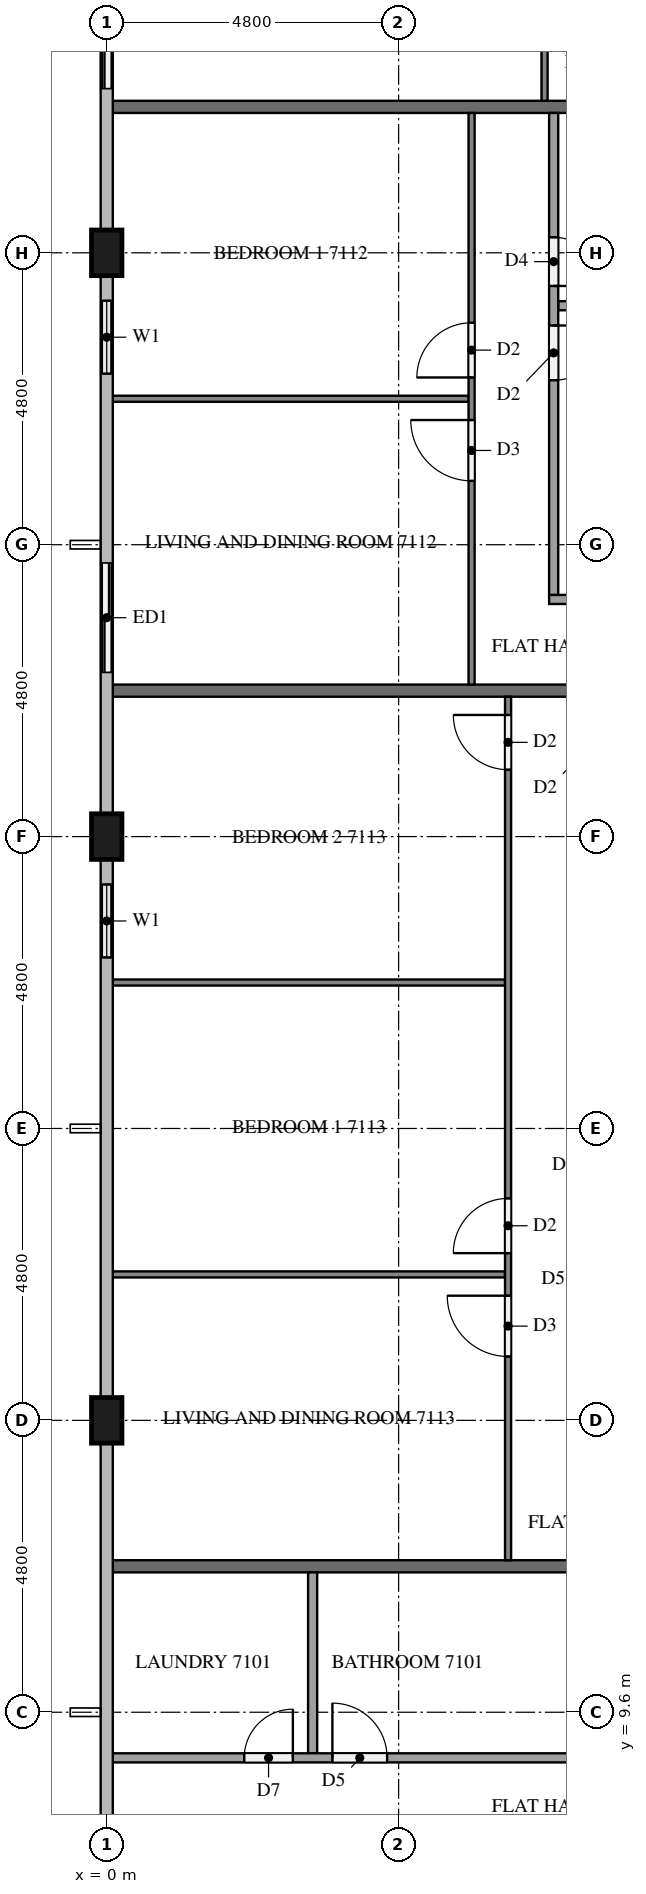
"""IFC4 building model, lengths in metres.
Left out: names, types, materials, properties, quantities, classifications, styles, units other than length and angle.
Written with IfcOpenShell. Run it as: python <this file> out.ifc"""

import sys

from ifc_helpers import new_model, si_unit, direction, frame, frame_2d, origin, origin_2d, place, context, subcontext, project, spatial, rectangle, extrude, element, fill, save


model = new_model("IFC4")
c1 = context("Model", 3, precision=1e-05, world=origin(), true_north=direction((0.0, 1.0)))
c2 = subcontext(c1, "Body", "Model", "MODEL_VIEW")
j1 = project(units=[si_unit("LENGTHUNIT", "METRE"), si_unit("PLANEANGLEUNIT", "RADIAN")], contexts=[c1])
p1 = place(None, origin())
s1 = spatial("IfcSite", under=j1, at=p1, CompositionType="ELEMENT")
p2 = place(p1, origin())
s2 = spatial("IfcBuilding", under=s1, at=p2, CompositionType="ELEMENT")
p3 = place(p2, frame((0.0, 0.0, 272.1)))
s3 = spatial("IfcBuildingStorey", under=s2, at=p3, CompositionType="ELEMENT", Elevation=272.1)
for number, where, z_axis, x_axis in (
    (1, (0.0, 33.6, 0.0), (0.0, 0.0, 1.0), (0.0, 1.0, 0.0)),
    (2, (0.0, 24.0, 0.0), (0.0, 0.0, 1.0), (0.0, 1.0, 0.0)),
    (3, (0.0, 14.4, 0.0), (0.0, 0.0, 1.0), (0.0, 1.0, 0.0)),
):
    element("IfcColumn", number, at=place(p3, frame(where, z_axis=z_axis, x_axis=x_axis)), inside=s3, PredefinedType="COLUMN", context=c2, shape_type="SweptSolid", body=[
        extrude(rectangle(XDim=0.75, YDim=0.5, at=origin_2d()), origin(), (0.0, 0.0, 1.0), 3.2),
    ])
p4 = place(p3, frame((0.0, 38.4, 0.0), z_axis=(0.0, 0.0, 1.0), x_axis=(0.0, -1.0, 0.0)))
e4 = element("IfcWall", 4, at=p4, inside=s3, PredefinedType="SOLIDWALL", context=c2, shape_type="SweptSolid", body=[
    extrude(rectangle(XDim=2.4, YDim=0.15, at=frame_2d((1.2, 0.0))), origin(), (0.0, 0.0, 1.0), 3.2),
])
p5 = place(p4, frame((0.3, 0.0, 0.0)))
e5 = element("IfcOpeningElement", 5, at=p5, cuts=e4, PredefinedType="OPENING", context=c2, shape_type="SweptSolid", body=[
    extrude(rectangle(XDim=1.8, YDim=2.4, at=frame_2d((0.9, 1.2))), frame((0.0, 0.085, 0.0), z_axis=(0.0, -1.0, 0.0), x_axis=(1.0, 0.0, 0.0)), (0.0, 0.0, 1.0), 0.17),
])
p6 = place(p3, frame((0.0, 33.225, 0.0), z_axis=(0.0, 0.0, 1.0), x_axis=(0.0, -1.0, 0.0)))
e6 = element("IfcWall", 6, at=p6, inside=s3, PredefinedType="SOLIDWALL", context=c2, shape_type="SweptSolid", body=[
    extrude(rectangle(XDim=2.025, YDim=0.15, at=frame_2d((1.013, 0.0))), origin(), (0.0, 0.0, 1.0), 3.2),
])
p7 = place(p6, frame((0.413, 0.0, 0.9)))
e7 = element("IfcOpeningElement", 7, at=p7, cuts=e6, PredefinedType="OPENING", context=c2, shape_type="SweptSolid", body=[
    extrude(rectangle(XDim=1.2, YDim=1.4, at=frame_2d((0.6, 0.7))), frame((0.0, 0.085, 0.0), z_axis=(0.0, -1.0, 0.0), x_axis=(1.0, 0.0, 0.0)), (0.0, 0.0, 1.0), 0.17),
])
p8 = place(p3, frame((0.0, 28.8, 0.0), z_axis=(0.0, 0.0, 1.0), x_axis=(0.0, -1.0, 0.0)))
e8 = element("IfcWall", 8, at=p8, inside=s3, PredefinedType="SOLIDWALL", context=c2, shape_type="SweptSolid", body=[
    extrude(rectangle(XDim=2.4, YDim=0.15, at=frame_2d((1.2, 0.0))), origin(), (0.0, 0.0, 1.0), 3.2),
])
p9 = place(p8, frame((0.3, 0.0, 0.0)))
e9 = element("IfcOpeningElement", 9, at=p9, cuts=e8, PredefinedType="OPENING", context=c2, shape_type="SweptSolid", body=[
    extrude(rectangle(XDim=1.8, YDim=2.4, at=frame_2d((0.9, 1.2))), frame((0.0, 0.085, 0.0), z_axis=(0.0, -1.0, 0.0), x_axis=(1.0, 0.0, 0.0)), (0.0, 0.0, 1.0), 0.17),
])
p10 = place(p3, frame((0.0, 23.625, 0.0), z_axis=(0.0, 0.0, 1.0), x_axis=(0.0, -1.0, 0.0)))
e10 = element("IfcWall", 10, at=p10, inside=s3, PredefinedType="SOLIDWALL", context=c2, shape_type="SweptSolid", body=[
    extrude(rectangle(XDim=2.025, YDim=0.15, at=frame_2d((1.012, 0.0))), origin(), (0.0, 0.0, 1.0), 3.2),
])
p11 = place(p10, frame((0.413, 0.0, 0.9)))
e11 = element("IfcOpeningElement", 11, at=p11, cuts=e10, PredefinedType="OPENING", context=c2, shape_type="SweptSolid", body=[
    extrude(rectangle(XDim=1.2, YDim=1.4, at=frame_2d((0.6, 0.7))), frame((0.0, 0.085, 0.0), z_axis=(0.0, -1.0, 0.0), x_axis=(1.0, 0.0, 0.0)), (0.0, 0.0, 1.0), 0.17),
])
for number, where, z_axis, x_axis in (
    (12, (0.1, 12.0, 0.0), (0.0, 0.0, 1.0), (1.0, 0.0, 0.0)),
    (13, (0.1, 36.0, 0.0), (0.0, 0.0, 1.0), (1.0, 0.0, 0.0)),
    (14, (0.1, 26.4, 0.0), (0.0, 0.0, 1.0), (1.0, 0.0, 0.0)),
):
    element("IfcWall", number, at=place(p3, frame(where, z_axis=z_axis, x_axis=x_axis)), inside=s3, PredefinedType="PARTITIONING", context=c2, shape_type="SweptSolid", body=[
        extrude(rectangle(XDim=11.8, YDim=0.2, at=frame_2d((5.9, 0.0))), origin(), (0.0, 0.0, 1.0), 3.2),
    ])
p12 = place(p3, frame((3.386, 11.9, 0.0), z_axis=(0.0, 0.0, 1.0), x_axis=(0.0, -1.0, 0.0)))
e15 = element("IfcWall", 15, at=p12, inside=s3, PredefinedType="PARTITIONING", context=c2, shape_type="SweptSolid", body=[
    extrude(rectangle(XDim=2.975, YDim=0.15, at=frame_2d((1.487, 0.0))), origin(), (0.0, 0.0, 1.0), 3.2),
])
p13 = place(p3, frame((0.1, 8.85, 0.0), z_axis=(0.0, 0.0, 1.0), x_axis=(1.0, 0.0, 0.0)))
e16 = element("IfcWall", 16, at=p13, inside=s3, PredefinedType="PARTITIONING", context=c2, shape_type="SweptSolid", body=[
    extrude(rectangle(XDim=17.525, YDim=0.15, at=frame_2d((8.762, 0.0))), origin(), (0.0, 0.0, 1.0), 3.2),
])
p14 = place(p13, frame((11.278, 0.0, 0.0)))
e17 = element("IfcOpeningElement", 17, at=p14, cuts=e16, PredefinedType="OPENING", context=c2, shape_type="SweptSolid", body=[
    extrude(rectangle(XDim=0.9, YDim=2.1, at=frame_2d((0.45, 1.05))), frame((0.0, 0.085, 0.0), z_axis=(0.0, -1.0, 0.0), x_axis=(1.0, 0.0, 0.0)), (0.0, 0.0, 1.0), 0.17),
])
p15 = place(p13, frame((9.828, 0.0, 0.0)))
e18 = element("IfcOpeningElement", 18, at=p15, cuts=e16, PredefinedType="OPENING", context=c2, shape_type="SweptSolid", body=[
    extrude(rectangle(XDim=0.8, YDim=2.1, at=frame_2d((0.4, 1.05))), frame((0.0, 0.085, 0.0), z_axis=(0.0, -1.0, 0.0), x_axis=(1.0, 0.0, 0.0)), (0.0, 0.0, 1.0), 0.17),
])
p16 = place(p13, frame((3.611, 0.0, 0.0)))
e19 = element("IfcOpeningElement", 19, at=p16, cuts=e16, PredefinedType="OPENING", context=c2, shape_type="SweptSolid", body=[
    extrude(rectangle(XDim=0.9, YDim=2.1, at=frame_2d((0.45, 1.05))), frame((0.0, 0.085, 0.0), z_axis=(0.0, -1.0, 0.0), x_axis=(1.0, 0.0, 0.0)), (0.0, 0.0, 1.0), 0.17),
])
p17 = place(p13, frame((2.161, 0.0, 0.0)))
e20 = element("IfcOpeningElement", 20, at=p17, cuts=e16, PredefinedType="OPENING", context=c2, shape_type="SweptSolid", body=[
    extrude(rectangle(XDim=0.8, YDim=2.1, at=frame_2d((0.4, 1.05))), frame((0.0, 0.085, 0.0), z_axis=(0.0, -1.0, 0.0), x_axis=(1.0, 0.0, 0.0)), (0.0, 0.0, 1.0), 0.17),
])
p18 = place(p3, frame((7.2, 36.1, 0.0), z_axis=(0.0, 0.0, 1.0), x_axis=(0.0, 1.0, 0.0)))
e21 = element("IfcWall", 21, at=p18, inside=s3, PredefinedType="PARTITIONING", context=c2, shape_type="SweptSolid", body=[
    extrude(rectangle(XDim=11.8, YDim=0.1, at=frame_2d((5.9, 0.0))), origin(), (0.0, 0.0, 1.0), 3.2),
])
p19 = place(p18, frame((5.75, 0.0, 0.0)))
e22 = element("IfcOpeningElement", 22, at=p19, cuts=e21, PredefinedType="OPENING", context=c2, shape_type="SweptSolid", body=[
    extrude(rectangle(XDim=1.0, YDim=2.1, at=frame_2d((0.5, 1.05))), frame((0.0, 0.06, 0.0), z_axis=(0.0, -1.0, 0.0), x_axis=(1.0, 0.0, 0.0)), (0.0, 0.0, 1.0), 0.12),
])
p20 = place(p18, frame((7.45, 0.0, 0.0)))
e23 = element("IfcOpeningElement", 23, at=p20, cuts=e21, PredefinedType="OPENING", context=c2, shape_type="SweptSolid", body=[
    extrude(rectangle(XDim=0.9, YDim=2.1, at=frame_2d((0.45, 1.05))), frame((0.0, 0.06, 0.0), z_axis=(0.0, -1.0, 0.0), x_axis=(1.0, 0.0, 0.0)), (0.0, 0.0, 1.0), 0.12),
])
p21 = place(p3, frame((5.95, 31.2, 0.0), z_axis=(0.0, 0.0, 1.0), x_axis=(-1.0, 0.0, 0.0)))
e24 = element("IfcWall", 24, at=p21, inside=s3, PredefinedType="PARTITIONING", context=c2, shape_type="SweptSolid", body=[
    extrude(rectangle(XDim=5.85, YDim=0.1, at=frame_2d((2.925, 0.0))), origin(), (0.0, 0.0, 1.0), 3.2),
])
p22 = place(p3, frame((6.0, 26.5, 0.0), z_axis=(0.0, 0.0, 1.0), x_axis=(0.0, 1.0, 0.0)))
e25 = element("IfcWall", 25, at=p22, inside=s3, PredefinedType="PARTITIONING", context=c2, shape_type="SweptSolid", body=[
    extrude(rectangle(XDim=9.4, YDim=0.1, at=frame_2d((4.7, 0.0))), origin(), (0.0, 0.0, 1.0), 3.2),
])
p23 = place(p22, frame((3.35, 0.0, 0.0)))
e26 = element("IfcOpeningElement", 26, at=p23, cuts=e25, PredefinedType="OPENING", context=c2, shape_type="SweptSolid", body=[
    extrude(rectangle(XDim=1.0, YDim=2.1, at=frame_2d((0.5, 1.05))), frame((0.0, 0.06, 0.0), z_axis=(0.0, -1.0, 0.0), x_axis=(1.0, 0.0, 0.0)), (0.0, 0.0, 1.0), 0.12),
])
p24 = place(p22, frame((5.05, 0.0, 0.0)))
e27 = element("IfcOpeningElement", 27, at=p24, cuts=e25, PredefinedType="OPENING", context=c2, shape_type="SweptSolid", body=[
    extrude(rectangle(XDim=0.9, YDim=2.1, at=frame_2d((0.45, 1.05))), frame((0.0, 0.06, 0.0), z_axis=(0.0, -1.0, 0.0), x_axis=(1.0, 0.0, 0.0)), (0.0, 0.0, 1.0), 0.12),
])
p25 = place(p3, frame((11.9, 32.73, 0.0), z_axis=(0.0, 0.0, 1.0), x_axis=(-1.0, 0.0, 0.0)))
e28 = element("IfcWall", 28, at=p25, inside=s3, PredefinedType="PARTITIONING", context=c2, shape_type="SweptSolid", body=[
    extrude(rectangle(XDim=4.475, YDim=0.15, at=frame_2d((2.237, 0.0))), origin(), (0.0, 0.0, 1.0), 3.2),
])
p26 = place(p3, frame((11.9, 27.9, 0.0), z_axis=(0.0, 0.0, 1.0), x_axis=(-1.0, 0.0, 0.0)))
e29 = element("IfcWall", 29, at=p26, inside=s3, PredefinedType="PARTITIONING", context=c2, shape_type="SweptSolid", body=[
    extrude(rectangle(XDim=4.625, YDim=0.15, at=frame_2d((2.312, 0.0))), origin(), (0.0, 0.0, 1.0), 3.2),
])
p27 = place(p3, frame((7.35, 35.9, 0.0), z_axis=(0.0, 0.0, 1.0), x_axis=(0.0, -1.0, 0.0)))
e30 = element("IfcWall", 30, at=p27, inside=s3, PredefinedType="PARTITIONING", context=c2, shape_type="SweptSolid", body=[
    extrude(rectangle(XDim=7.925, YDim=0.15, at=frame_2d((3.962, 0.0))), origin(), (0.0, 0.0, 1.0), 3.2),
])
p28 = place(p27, frame((3.495, 0.0, 0.0)))
e31 = element("IfcOpeningElement", 31, at=p28, cuts=e30, PredefinedType="OPENING", context=c2, shape_type="SweptSolid", body=[
    extrude(rectangle(XDim=0.9, YDim=2.1, at=frame_2d((0.45, 1.05))), frame((0.0, 0.085, 0.0), z_axis=(0.0, -1.0, 0.0), x_axis=(1.0, 0.0, 0.0)), (0.0, 0.0, 1.0), 0.17),
])
p29 = place(p27, frame((2.045, 0.0, 0.0)))
e32 = element("IfcOpeningElement", 32, at=p29, cuts=e30, PredefinedType="OPENING", context=c2, shape_type="SweptSolid", body=[
    extrude(rectangle(XDim=0.8, YDim=2.1, at=frame_2d((0.4, 1.05))), frame((0.0, 0.085, 0.0), z_axis=(0.0, -1.0, 0.0), x_axis=(1.0, 0.0, 0.0)), (0.0, 0.0, 1.0), 0.17),
])
for number, where, z_axis, x_axis in (
    (33, (6.55, 16.8, 0.0), (0.0, 0.0, 1.0), (-1.0, 0.0, 0.0)),
    (34, (6.55, 21.6, 0.0), (0.0, 0.0, 1.0), (-1.0, 0.0, 0.0)),
):
    element("IfcWall", number, at=place(p3, frame(where, z_axis=z_axis, x_axis=x_axis)), inside=s3, PredefinedType="PARTITIONING", context=c2, shape_type="SweptSolid", body=[
        extrude(rectangle(XDim=6.45, YDim=0.1, at=frame_2d((3.225, 0.0))), origin(), (0.0, 0.0, 1.0), 3.2),
    ])
p30 = place(p3, frame((6.6, 12.1, 0.0), z_axis=(0.0, 0.0, 1.0), x_axis=(0.0, 1.0, 0.0)))
e35 = element("IfcWall", 35, at=p30, inside=s3, PredefinedType="PARTITIONING", context=c2, shape_type="SweptSolid", body=[
    extrude(rectangle(XDim=14.2, YDim=0.1, at=frame_2d((7.1, 0.0))), origin(), (0.0, 0.0, 1.0), 3.2),
])
p31 = place(p30, frame((3.35, 0.0, 0.0)))
e36 = element("IfcOpeningElement", 36, at=p31, cuts=e35, PredefinedType="OPENING", context=c2, shape_type="SweptSolid", body=[
    extrude(rectangle(XDim=1.0, YDim=2.1, at=frame_2d((0.5, 1.05))), frame((0.0, 0.06, 0.0), z_axis=(0.0, -1.0, 0.0), x_axis=(1.0, 0.0, 0.0)), (0.0, 0.0, 1.0), 0.12),
])
p32 = place(p30, frame((5.05, 0.0, 0.0)))
e37 = element("IfcOpeningElement", 37, at=p32, cuts=e35, PredefinedType="OPENING", context=c2, shape_type="SweptSolid", body=[
    extrude(rectangle(XDim=0.9, YDim=2.1, at=frame_2d((0.45, 1.05))), frame((0.0, 0.06, 0.0), z_axis=(0.0, -1.0, 0.0), x_axis=(1.0, 0.0, 0.0)), (0.0, 0.0, 1.0), 0.12),
])
p33 = place(p30, frame((13.0, 0.0, 0.0)))
e38 = element("IfcOpeningElement", 38, at=p33, cuts=e35, PredefinedType="OPENING", context=c2, shape_type="SweptSolid", body=[
    extrude(rectangle(XDim=0.9, YDim=2.1, at=frame_2d((0.45, 1.05))), frame((0.0, 0.06, 0.0), z_axis=(0.0, -1.0, 0.0), x_axis=(1.0, 0.0, 0.0)), (0.0, 0.0, 1.0), 0.12),
])
p34 = place(p5, origin())
e39 = element("IfcDoor", 39, at=p34, inside=s3, OperationType="SLIDING_TO_LEFT", PredefinedType="DOOR", context=c2, shape_type="SweptSolid", body=[
    extrude(rectangle(XDim=1.8, YDim=2.4, at=frame_2d((0.9, 1.2))), frame((0.0, 0.025, 0.0), z_axis=(0.0, -1.0, 0.0), x_axis=(1.0, 0.0, 0.0)), (0.0, 0.0, 1.0), 0.05),
])
fill(e5, e39)
p35 = place(p7, origin())
e40 = element("IfcWindow", 40, at=p35, inside=s3, PartitioningType="SINGLE_PANEL", PredefinedType="WINDOW", context=c2, shape_type="SweptSolid", body=[
    extrude(rectangle(XDim=1.2, YDim=1.4, at=frame_2d((0.6, 0.7))), frame((0.0, 0.03, 0.0), z_axis=(0.0, -1.0, 0.0), x_axis=(1.0, 0.0, 0.0)), (0.0, 0.0, 1.0), 0.06),
])
fill(e7, e40)
p36 = place(p9, origin())
e41 = element("IfcDoor", 41, at=p36, inside=s3, OperationType="SLIDING_TO_RIGHT", PredefinedType="DOOR", context=c2, shape_type="SweptSolid", body=[
    extrude(rectangle(XDim=1.8, YDim=2.4, at=frame_2d((0.9, 1.2))), frame((0.0, 0.025, 0.0), z_axis=(0.0, -1.0, 0.0), x_axis=(1.0, 0.0, 0.0)), (0.0, 0.0, 1.0), 0.05),
])
fill(e9, e41)
p37 = place(p11, origin())
e42 = element("IfcWindow", 42, at=p37, inside=s3, PartitioningType="SINGLE_PANEL", PredefinedType="WINDOW", context=c2, shape_type="SweptSolid", body=[
    extrude(rectangle(XDim=1.2, YDim=1.4, at=frame_2d((0.6, 0.7))), frame((0.0, 0.03, 0.0), z_axis=(0.0, -1.0, 0.0), x_axis=(1.0, 0.0, 0.0)), (0.0, 0.0, 1.0), 0.06),
])
fill(e11, e42)
p38 = place(p16, origin())
e43 = element("IfcDoor", 43, at=p38, inside=s3, OperationType="SINGLE_SWING_LEFT", PredefinedType="DOOR", context=c2, shape_type="SweptSolid", body=[
    extrude(rectangle(XDim=0.9, YDim=2.1, at=frame_2d((0.45, 1.05))), frame((0.0, 0.025, 0.0), z_axis=(0.0, -1.0, 0.0), x_axis=(1.0, 0.0, 0.0)), (0.0, 0.0, 1.0), 0.05),
])
fill(e19, e43)
p39 = place(p17, origin())
e44 = element("IfcDoor", 44, at=p39, inside=s3, OperationType="SINGLE_SWING_RIGHT", PredefinedType="DOOR", context=c2, shape_type="SweptSolid", body=[
    extrude(rectangle(XDim=0.8, YDim=2.1, at=frame_2d((0.4, 1.05))), frame((0.0, 0.025, 0.0), z_axis=(0.0, -1.0, 0.0), x_axis=(1.0, 0.0, 0.0)), (0.0, 0.0, 1.0), 0.05),
])
fill(e20, e44)
p40 = place(p23, origin())
e45 = element("IfcDoor", 45, at=p40, inside=s3, OperationType="SINGLE_SWING_RIGHT", PredefinedType="DOOR", context=c2, shape_type="SweptSolid", body=[
    extrude(rectangle(XDim=1.0, YDim=2.1, at=frame_2d((0.5, 1.05))), frame((0.0, 0.025, 0.0), z_axis=(0.0, -1.0, 0.0), x_axis=(1.0, 0.0, 0.0)), (0.0, 0.0, 1.0), 0.05),
])
fill(e26, e45)
p41 = place(p24, origin())
e46 = element("IfcDoor", 46, at=p41, inside=s3, OperationType="SINGLE_SWING_LEFT", PredefinedType="DOOR", context=c2, shape_type="SweptSolid", body=[
    extrude(rectangle(XDim=0.9, YDim=2.1, at=frame_2d((0.45, 1.05))), frame((0.0, 0.025, 0.0), z_axis=(0.0, -1.0, 0.0), x_axis=(1.0, 0.0, 0.0)), (0.0, 0.0, 1.0), 0.05),
])
fill(e27, e46)
p42 = place(p28, origin())
e47 = element("IfcDoor", 47, at=p42, inside=s3, OperationType="SINGLE_SWING_LEFT", PredefinedType="DOOR", context=c2, shape_type="SweptSolid", body=[
    extrude(rectangle(XDim=0.9, YDim=2.1, at=frame_2d((0.45, 1.05))), frame((0.0, 0.025, 0.0), z_axis=(0.0, -1.0, 0.0), x_axis=(1.0, 0.0, 0.0)), (0.0, 0.0, 1.0), 0.05),
])
fill(e31, e47)
p43 = place(p29, origin())
e48 = element("IfcDoor", 48, at=p43, inside=s3, OperationType="SINGLE_SWING_RIGHT", PredefinedType="DOOR", context=c2, shape_type="SweptSolid", body=[
    extrude(rectangle(XDim=0.8, YDim=2.1, at=frame_2d((0.4, 1.05))), frame((0.0, 0.025, 0.0), z_axis=(0.0, -1.0, 0.0), x_axis=(1.0, 0.0, 0.0)), (0.0, 0.0, 1.0), 0.05),
])
fill(e32, e48)
p44 = place(p31, origin())
e49 = element("IfcDoor", 49, at=p44, inside=s3, OperationType="SINGLE_SWING_RIGHT", PredefinedType="DOOR", context=c2, shape_type="SweptSolid", body=[
    extrude(rectangle(XDim=1.0, YDim=2.1, at=frame_2d((0.5, 1.05))), frame((0.0, 0.025, 0.0), z_axis=(0.0, -1.0, 0.0), x_axis=(1.0, 0.0, 0.0)), (0.0, 0.0, 1.0), 0.05),
])
fill(e36, e49)
p45 = place(p32, origin())
e50 = element("IfcDoor", 50, at=p45, inside=s3, OperationType="SINGLE_SWING_LEFT", PredefinedType="DOOR", context=c2, shape_type="SweptSolid", body=[
    extrude(rectangle(XDim=0.9, YDim=2.1, at=frame_2d((0.45, 1.05))), frame((0.0, 0.025, 0.0), z_axis=(0.0, -1.0, 0.0), x_axis=(1.0, 0.0, 0.0)), (0.0, 0.0, 1.0), 0.05),
])
fill(e37, e50)
p46 = place(p33, origin())
e51 = element("IfcDoor", 51, at=p46, inside=s3, OperationType="SINGLE_SWING_RIGHT", PredefinedType="DOOR", context=c2, shape_type="SweptSolid", body=[
    extrude(rectangle(XDim=0.9, YDim=2.1, at=frame_2d((0.45, 1.05))), frame((0.0, 0.025, 0.0), z_axis=(0.0, -1.0, 0.0), x_axis=(1.0, 0.0, 0.0)), (0.0, 0.0, 1.0), 0.05),
])
fill(e38, e51)
save(model, sys.argv[1])
